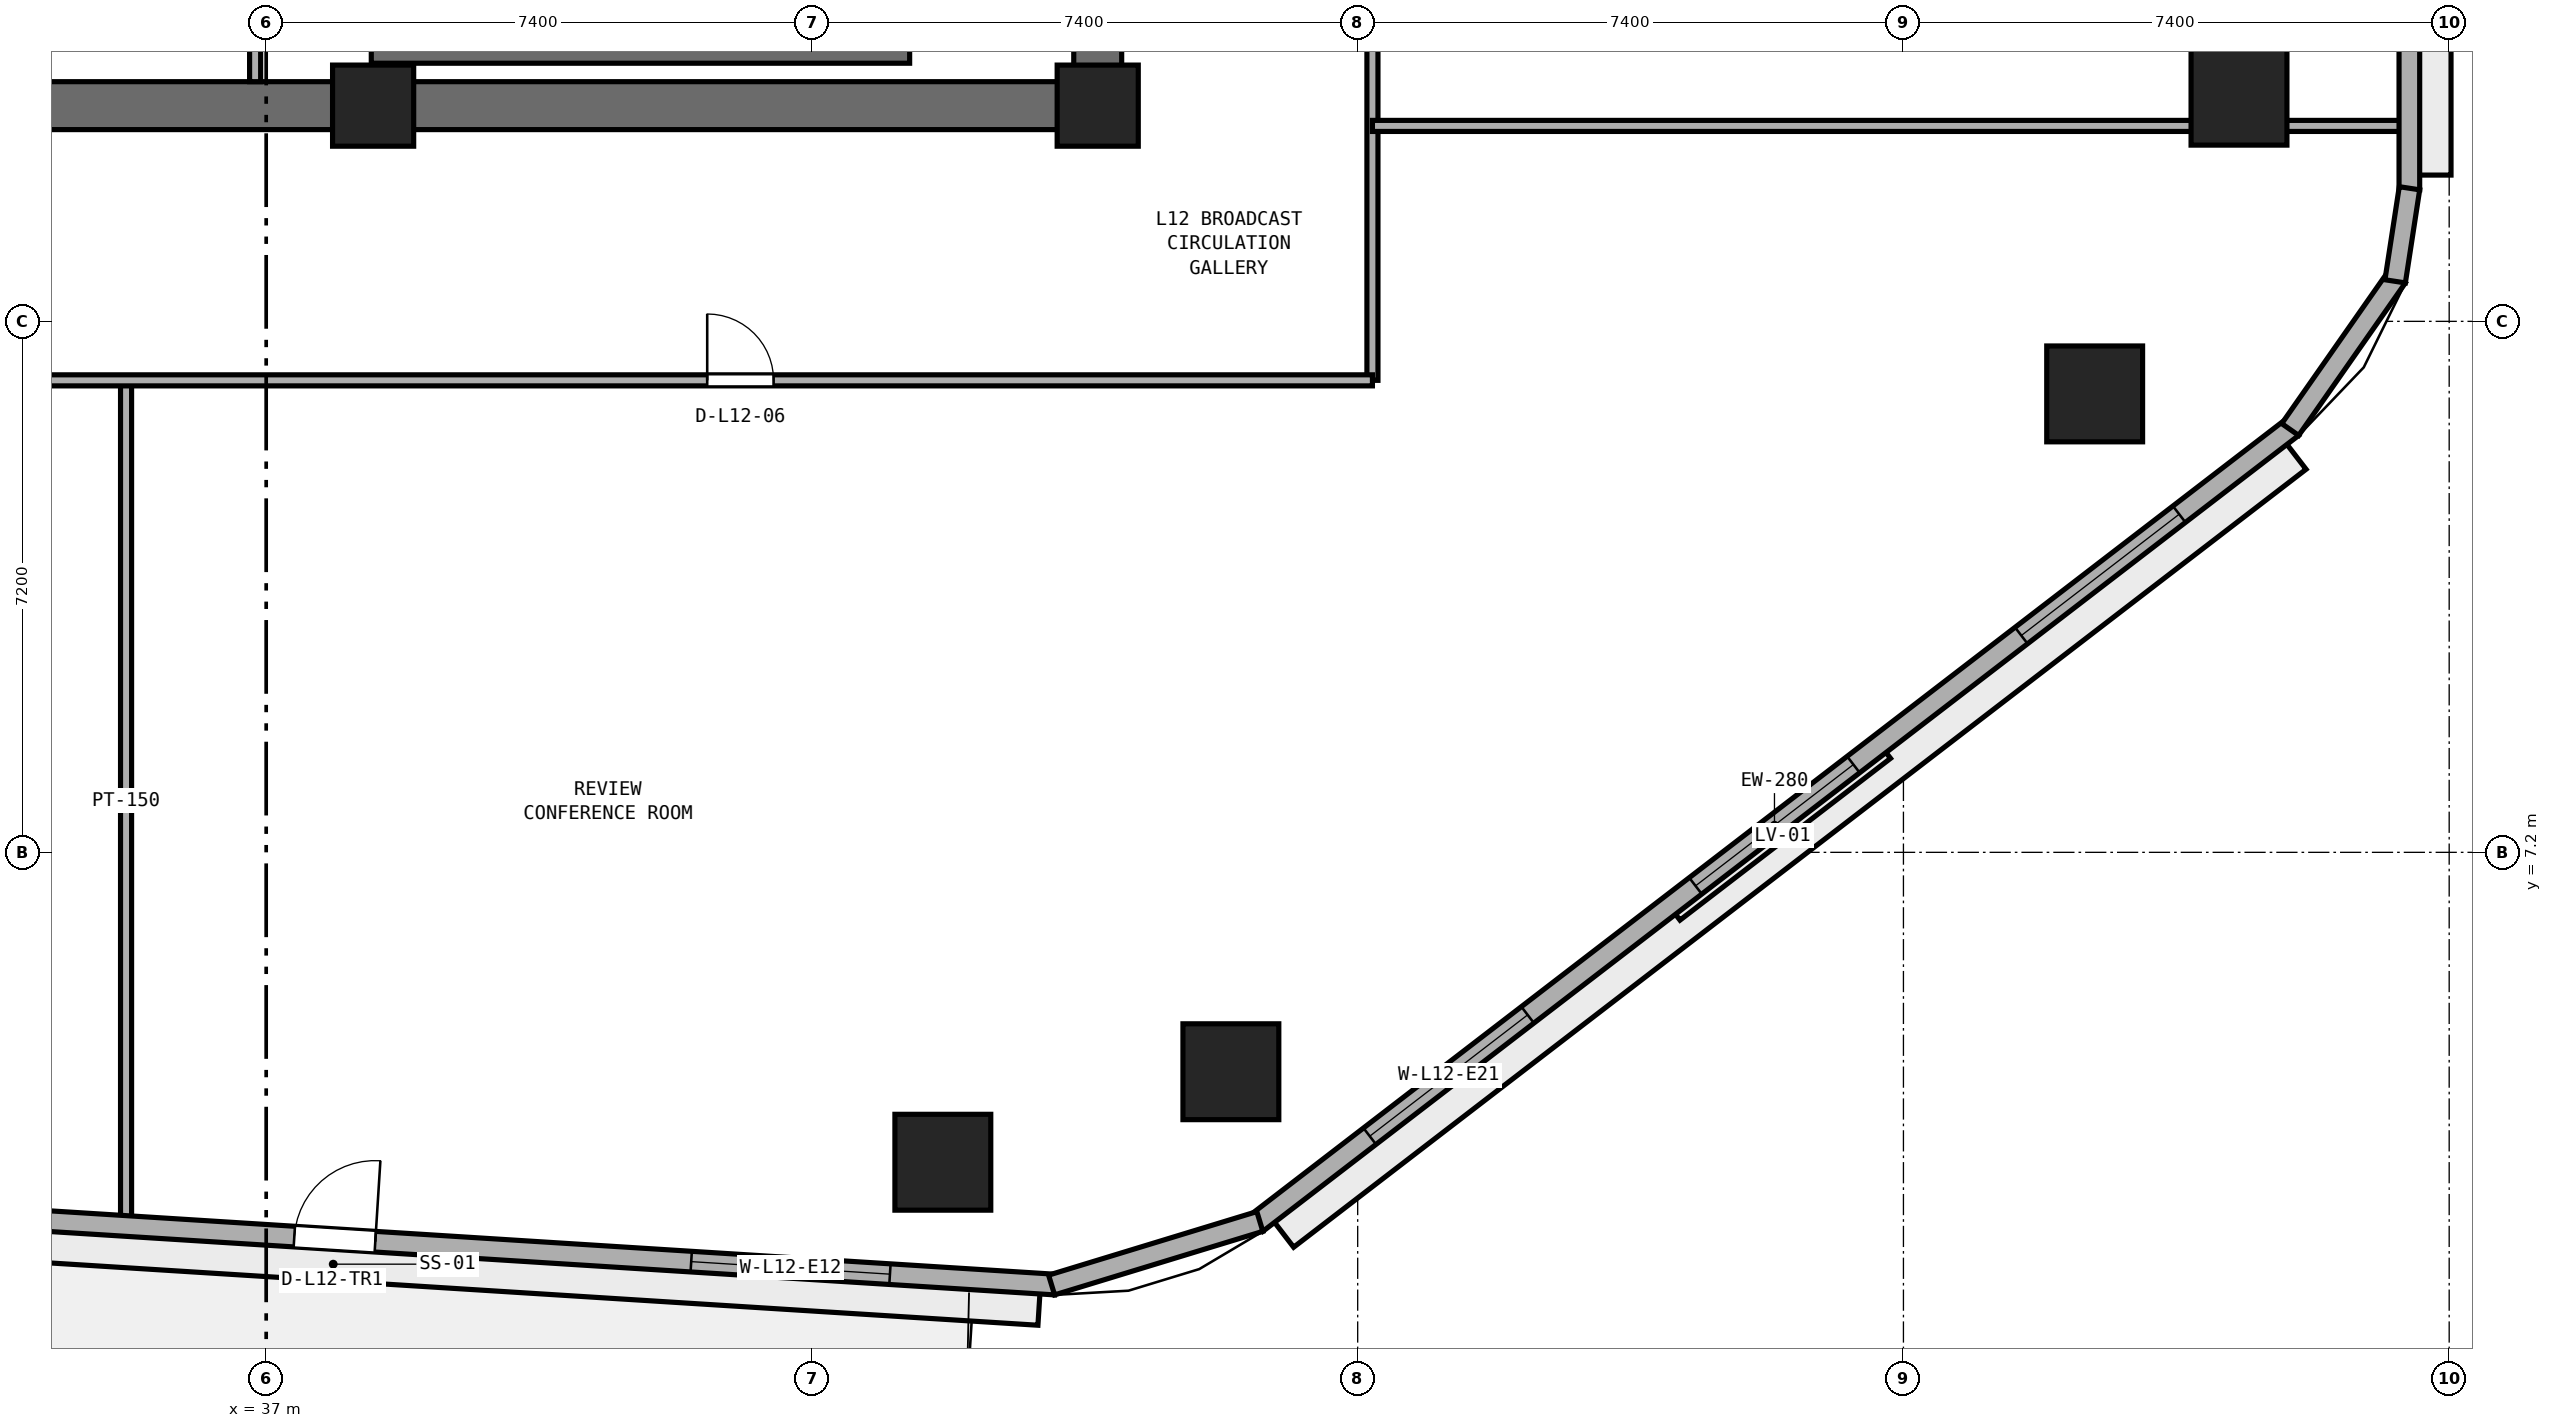
"""IFC4 building model, lengths in metres.
Left out: names, types, materials, properties, quantities, classifications, styles, units other than length and angle.
Written with IfcOpenShell. Run it as: python <this file> out.ifc"""

import sys

from ifc_helpers import new_model, si_unit, direction, frame, frame_2d, origin, origin_2d, place, context, subcontext, project, spatial, rectangle, extrude, element, fill, save


model = new_model("IFC4")
c1 = context("Model", 3, precision=1e-05, world=origin(), true_north=direction((0.0, 1.0)))
c2 = subcontext(c1, "Body", "Model", "MODEL_VIEW")
j1 = project(units=[si_unit("LENGTHUNIT", "METRE"), si_unit("PLANEANGLEUNIT", "RADIAN")], contexts=[c1])
p1 = place(None, origin())
s1 = spatial("IfcSite", under=j1, at=p1, CompositionType="ELEMENT")
p2 = place(p1, origin())
s2 = spatial("IfcBuilding", under=s1, at=p2, CompositionType="ELEMENT")
p3 = place(p2, frame((0.0, 0.0, 51.6)))
s3 = spatial("IfcBuildingStorey", under=s2, at=p3, CompositionType="ELEMENT", Elevation=51.6)
p4 = place(p3, frame((25.4, 17.325, 0.0), z_axis=(0.0, 0.0, 1.0), x_axis=(1.0, 0.0, 0.0)))
e1 = element("IfcWall", 1, at=p4, inside=s3, PredefinedType="SHEAR", context=c2, shape_type="SweptSolid", body=[
    extrude(rectangle(XDim=23.2, YDim=0.65, at=frame_2d((11.6, 0.0))), origin(), (0.0, 0.0, 1.0), 3.525),
])
p5 = place(p3, frame((48.275, 17.65, 0.0), z_axis=(0.0, 0.0, 1.0), x_axis=(0.0, 1.0, 0.0)))
e2 = element("IfcWall", 2, at=p5, inside=s3, PredefinedType="SHEAR", context=c2, shape_type="SweptSolid", body=[
    extrude(rectangle(XDim=15.1, YDim=0.65, at=frame_2d((7.55, 0.0))), origin(), (0.0, 0.0, 1.0), 3.525),
])
p6 = place(p5, frame((5.65, 0.0, 0.0)))
e3 = element("IfcOpeningElement", 3, at=p6, cuts=e2, PredefinedType="OPENING", context=c2, shape_type="SweptSolid", body=[
    extrude(rectangle(XDim=1.5, YDim=2.15, at=frame_2d((0.75, 1.075))), frame((0.0, 0.335, 0.0), z_axis=(0.0, -1.0, 0.0), x_axis=(1.0, 0.0, 0.0)), (0.0, 0.0, 1.0), 0.67),
])
for number, where, z_axis, x_axis in (
    (4, (38.45, 17.325, 0.0), (0.0, 0.0, 1.0), (1.0, 0.0, 0.0)),
    (5, (48.275, 17.325, 0.0), (0.0, 0.0, 1.0), (1.0, 0.0, 0.0)),
):
    element("IfcColumn", number, at=place(p3, frame(where, z_axis=z_axis, x_axis=x_axis)), inside=s3, PredefinedType="PILASTER", context=c2, shape_type="SweptSolid", body=[
        extrude(rectangle(XDim=1.1, YDim=1.1, at=origin_2d()), origin(), (0.0, 0.0, 1.0), 3.8),
    ])
for number, where, z_axis, x_axis in (
    (6, (46.175, 2.998, 0.0), (0.0, 0.0, 1.0), (1.0, 0.0, 0.0)),
    (7, (50.081, 4.225, 0.0), (0.0, 0.0, 1.0), (1.0, 0.0, 0.0)),
    (8, (61.793, 13.416, 0.0), (0.0, 0.0, 1.0), (1.0, 0.0, 0.0)),
    (9, (63.75, 17.44, 0.0), (0.0, 0.0, 1.0), (1.0, 0.0, 0.0)),
):
    element("IfcColumn", number, at=place(p3, frame(where, z_axis=z_axis, x_axis=x_axis)), inside=s3, PredefinedType="COLUMN", context=c2, shape_type="SweptSolid", body=[
        extrude(rectangle(XDim=1.3, YDim=1.3, at=origin_2d()), origin(), (0.0, 0.0, 1.0), 3.8),
    ])
p7 = place(p3, frame((38.425, 18.025, 0.0), z_axis=(0.0, 0.0, 1.0), x_axis=(1.0, 0.0, 0.0)))
e10 = element("IfcWall", 10, at=p7, inside=s3, PredefinedType="SHEAR", context=c2, shape_type="SweptSolid", body=[
    extrude(rectangle(XDim=7.3, YDim=0.25, at=frame_2d((3.65, 0.0))), origin(), (0.0, 0.0, 1.0), 3.525),
])
p8 = place(p3, frame((36.85, 17.65, 0.0), z_axis=(0.0, 0.0, 1.0), x_axis=(0.0, 1.0, 0.0)))
e11 = element("IfcWall", 11, at=p8, inside=s3, PredefinedType="PARTITIONING", context=c2, shape_type="SweptSolid", body=[
    extrude(rectangle(XDim=2.1, YDim=0.15, at=frame_2d((1.05, 0.0))), origin(), (0.0, 0.0, 1.0), 3.525),
])
p9 = place(p3, frame((52.0, 13.6, 0.0), z_axis=(0.0, 0.0, 1.0), x_axis=(0.0, 1.0, 0.0)))
e12 = element("IfcWall", 12, at=p9, inside=s3, PredefinedType="PARTITIONING", context=c2, shape_type="SweptSolid", body=[
    extrude(rectangle(XDim=33.691, YDim=0.15, at=frame_2d((16.846, 0.0))), origin(), (0.0, 0.0, 1.0), 3.525),
])
p10 = place(p9, frame((6.075, 0.0, 0.0)))
e13 = element("IfcOpeningElement", 13, at=p10, cuts=e12, PredefinedType="OPENING", context=c2, shape_type="SweptSolid", body=[
    extrude(rectangle(XDim=1.0, YDim=2.12, at=frame_2d((0.5, 1.06))), frame((0.0, 0.085, 0.0), z_axis=(0.0, -1.0, 0.0), x_axis=(1.0, 0.0, 0.0)), (0.0, 0.0, 1.0), 0.17),
])
p11 = place(p9, frame((12.6, 0.0, 0.0)))
e14 = element("IfcOpeningElement", 14, at=p11, cuts=e12, PredefinedType="OPENING", context=c2, shape_type="SweptSolid", body=[
    extrude(rectangle(XDim=1.0, YDim=2.12, at=frame_2d((0.5, 1.06))), frame((0.0, 0.085, 0.0), z_axis=(0.0, -1.0, 0.0), x_axis=(1.0, 0.0, 0.0)), (0.0, 0.0, 1.0), 0.17),
])
p12 = place(p9, frame((19.35, 0.0, 0.0)))
e15 = element("IfcOpeningElement", 15, at=p12, cuts=e12, PredefinedType="OPENING", context=c2, shape_type="SweptSolid", body=[
    extrude(rectangle(XDim=1.0, YDim=2.12, at=frame_2d((0.5, 1.06))), frame((0.0, 0.085, 0.0), z_axis=(0.0, -1.0, 0.0), x_axis=(1.0, 0.0, 0.0)), (0.0, 0.0, 1.0), 0.17),
])
p13 = place(p3, frame((35.1, 2.198, 0.0), z_axis=(0.0, 0.0, 1.0), x_axis=(0.0, 1.0, 0.0)))
e16 = element("IfcWall", 16, at=p13, inside=s3, PredefinedType="PARTITIONING", context=c2, shape_type="SweptSolid", body=[
    extrude(rectangle(XDim=11.402, YDim=0.15, at=frame_2d((5.701, 0.0))), origin(), (0.0, 0.0, 1.0), 3.525),
])
p14 = place(p3, frame((22.0, 13.6, 0.0), z_axis=(0.0, 0.0, 1.0), x_axis=(1.0, 0.0, 0.0)))
e17 = element("IfcWall", 17, at=p14, inside=s3, PredefinedType="PARTITIONING", context=c2, shape_type="SweptSolid", body=[
    extrude(rectangle(XDim=30.0, YDim=0.15, at=frame_2d((15.0, 0.0))), origin(), (0.0, 0.0, 1.0), 3.525),
])
p15 = place(p14, frame((6.22, 0.0, 0.0)))
e18 = element("IfcOpeningElement", 18, at=p15, cuts=e17, PredefinedType="OPENING", context=c2, shape_type="SweptSolid", body=[
    extrude(rectangle(XDim=0.9, YDim=2.1, at=frame_2d((0.45, 1.05))), frame((0.0, 0.085, 0.0), z_axis=(0.0, -1.0, 0.0), x_axis=(1.0, 0.0, 0.0)), (0.0, 0.0, 1.0), 0.17),
])
p16 = place(p14, frame((20.98, 0.0, 0.0)))
e19 = element("IfcOpeningElement", 19, at=p16, cuts=e17, PredefinedType="OPENING", context=c2, shape_type="SweptSolid", body=[
    extrude(rectangle(XDim=0.9, YDim=2.1, at=frame_2d((0.45, 1.05))), frame((0.0, 0.085, 0.0), z_axis=(0.0, -1.0, 0.0), x_axis=(1.0, 0.0, 0.0)), (0.0, 0.0, 1.0), 0.17),
])
p17 = place(p3, frame((52.0, 17.05, 0.0), z_axis=(0.0, 0.0, 1.0), x_axis=(1.0, 0.0, 0.0)))
e20 = element("IfcWall", 20, at=p17, inside=s3, PredefinedType="PARTITIONING", context=c2, shape_type="SweptSolid", body=[
    extrude(rectangle(XDim=13.995, YDim=0.15, at=frame_2d((6.998, 0.0))), origin(), (0.0, 0.0, 1.0), 3.525),
])
p18 = place(p3, frame((28.161, 2.571, 0.0), z_axis=(0.0, 0.0, 1.0), x_axis=(0.998017288298, -0.06294038654, 0.0)))
e21 = element("IfcWall", 21, at=p18, inside=s3, PredefinedType="STANDARD", context=c2, shape_type="SweptSolid", body=[
    extrude(rectangle(XDim=19.577, YDim=0.28, at=frame_2d((9.789, 0.0))), origin(), (0.0, 0.0, 1.0), 3.525),
])
p19 = place(p18, frame((9.239, 0.0, 0.0)))
e22 = element("IfcOpeningElement", 22, at=p19, cuts=e21, PredefinedType="OPENING", context=c2, shape_type="SweptSolid", body=[
    extrude(rectangle(XDim=1.1, YDim=2.2, at=frame_2d((0.55, 1.1))), frame((0.0, 0.15, 0.0), z_axis=(0.0, -1.0, 0.0), x_axis=(1.0, 0.0, 0.0)), (0.0, 0.0, 1.0), 0.3),
])
p20 = place(p18, frame((2.246, 0.0, 0.9)))
e23 = element("IfcOpeningElement", 23, at=p20, cuts=e21, PredefinedType="OPENING", context=c2, shape_type="SweptSolid", body=[
    extrude(rectangle(XDim=2.7, YDim=1.75, at=frame_2d((1.35, 0.875))), frame((0.0, 0.15, 0.0), z_axis=(0.0, -1.0, 0.0), x_axis=(1.0, 0.0, 0.0)), (0.0, 0.0, 1.0), 0.3),
])
p21 = place(p18, frame((14.631, 0.0, 0.9)))
e24 = element("IfcOpeningElement", 24, at=p21, cuts=e21, PredefinedType="OPENING", context=c2, shape_type="SweptSolid", body=[
    extrude(rectangle(XDim=2.7, YDim=1.75, at=frame_2d((1.35, 0.875))), frame((0.0, 0.15, 0.0), z_axis=(0.0, -1.0, 0.0), x_axis=(1.0, 0.0, 0.0)), (0.0, 0.0, 1.0), 0.3),
])
p22 = place(p3, frame((50.429, 2.172, 0.0), z_axis=(0.0, 0.0, 1.0), x_axis=(0.792937466367, 0.609303023488, 0.0)))
e25 = element("IfcWall", 25, at=p22, inside=s3, PredefinedType="STANDARD", context=c2, shape_type="SweptSolid", body=[
    extrude(rectangle(XDim=17.713, YDim=0.28, at=frame_2d((8.856, 0.0))), origin(), (0.0, 0.0, 1.0), 3.525),
])
p23 = place(p22, frame((1.936, 0.0, 0.9)))
e26 = element("IfcOpeningElement", 26, at=p23, cuts=e25, PredefinedType="OPENING", context=c2, shape_type="SweptSolid", body=[
    extrude(rectangle(XDim=2.7, YDim=1.75, at=frame_2d((1.35, 0.875))), frame((0.0, 0.15, 0.0), z_axis=(0.0, -1.0, 0.0), x_axis=(1.0, 0.0, 0.0)), (0.0, 0.0, 1.0), 0.3),
])
p24 = place(p22, frame((7.506, 0.0, 0.9)))
e27 = element("IfcOpeningElement", 27, at=p24, cuts=e25, PredefinedType="OPENING", context=c2, shape_type="SweptSolid", body=[
    extrude(rectangle(XDim=2.7, YDim=1.75, at=frame_2d((1.35, 0.875))), frame((0.0, 0.15, 0.0), z_axis=(0.0, -1.0, 0.0), x_axis=(1.0, 0.0, 0.0)), (0.0, 0.0, 1.0), 0.3),
])
p25 = place(p22, frame((13.077, 0.0, 0.9)))
e28 = element("IfcOpeningElement", 28, at=p25, cuts=e25, PredefinedType="OPENING", context=c2, shape_type="SweptSolid", body=[
    extrude(rectangle(XDim=2.7, YDim=1.75, at=frame_2d((1.35, 0.875))), frame((0.0, 0.15, 0.0), z_axis=(0.0, -1.0, 0.0), x_axis=(1.0, 0.0, 0.0)), (0.0, 0.0, 1.0), 0.3),
])
p26 = place(p3, frame((66.06, 16.183, 0.0), z_axis=(0.0, 0.0, 1.0), x_axis=(0.0, 1.0, 0.0)))
e29 = element("IfcWall", 29, at=p26, inside=s3, PredefinedType="STANDARD", context=c2, shape_type="SweptSolid", body=[
    extrude(rectangle(XDim=19.331, YDim=0.28, at=frame_2d((9.666, 0.0))), origin(), (0.0, 0.0, 1.0), 3.525),
])
p27 = place(p26, frame((2.205, 0.0, 0.9)))
e30 = element("IfcOpeningElement", 30, at=p27, cuts=e29, PredefinedType="OPENING", context=c2, shape_type="SweptSolid", body=[
    extrude(rectangle(XDim=2.7, YDim=1.75, at=frame_2d((1.35, 0.875))), frame((0.0, 0.15, 0.0), z_axis=(0.0, -1.0, 0.0), x_axis=(1.0, 0.0, 0.0)), (0.0, 0.0, 1.0), 0.3),
])
p28 = place(p26, frame((8.315, 0.0, 0.9)))
e31 = element("IfcOpeningElement", 31, at=p28, cuts=e29, PredefinedType="OPENING", context=c2, shape_type="SweptSolid", body=[
    extrude(rectangle(XDim=2.7, YDim=1.75, at=frame_2d((1.35, 0.875))), frame((0.0, 0.15, 0.0), z_axis=(0.0, -1.0, 0.0), x_axis=(1.0, 0.0, 0.0)), (0.0, 0.0, 1.0), 0.3),
])
p29 = place(p26, frame((14.426, 0.0, 0.9)))
e32 = element("IfcOpeningElement", 32, at=p29, cuts=e29, PredefinedType="OPENING", context=c2, shape_type="SweptSolid", body=[
    extrude(rectangle(XDim=2.7, YDim=1.75, at=frame_2d((1.35, 0.875))), frame((0.0, 0.15, 0.0), z_axis=(0.0, -1.0, 0.0), x_axis=(1.0, 0.0, 0.0)), (0.0, 0.0, 1.0), 0.3),
])
p30 = place(p3, frame((47.65, 1.333, 0.0), z_axis=(0.0, 0.0, 1.0), x_axis=(0.956461287977, 0.291859220516, 0.0)))
e33 = element("IfcWall", 33, at=p30, inside=s3, PredefinedType="STANDARD", context=c2, shape_type="SweptSolid", body=[
    extrude(rectangle(XDim=2.952, YDim=0.28, at=frame_2d((1.476, 0.0))), origin(), (0.0, 0.0, 1.0), 3.525),
])
p31 = place(p3, frame((64.444, 12.933, 0.0), z_axis=(0.0, 0.0, 1.0), x_axis=(0.573176686443, 0.819431806875, 0.0)))
e34 = element("IfcWall", 34, at=p31, inside=s3, PredefinedType="STANDARD", context=c2, shape_type="SweptSolid", body=[
    extrude(rectangle(XDim=2.524, YDim=0.28, at=frame_2d((1.262, 0.0))), origin(), (0.0, 0.0, 1.0), 3.525),
])
p32 = place(p3, frame((65.867, 14.943, 0.0), z_axis=(0.0, 0.0, 1.0), x_axis=(0.152014078361, 0.988378328364, 0.0)))
e35 = element("IfcWall", 35, at=p32, inside=s3, PredefinedType="STANDARD", context=c2, shape_type="SweptSolid", body=[
    extrude(rectangle(XDim=1.277, YDim=0.28, at=frame_2d((0.638, 0.0))), origin(), (0.0, 0.0, 1.0), 3.525),
])
p33 = place(p16, origin())
e36 = element("IfcDoor", 36, at=p33, inside=s3, OperationType="SINGLE_SWING_LEFT", PredefinedType="DOOR", context=c2, shape_type="SweptSolid", body=[
    extrude(rectangle(XDim=0.9, YDim=2.1, at=frame_2d((0.45, 1.05))), frame((0.0, 0.025, 0.0), z_axis=(0.0, -1.0, 0.0), x_axis=(1.0, 0.0, 0.0)), (0.0, 0.0, 1.0), 0.05),
])
fill(e19, e36)
p34 = place(p19, origin())
e37 = element("IfcDoor", 37, at=p34, inside=s3, OperationType="SINGLE_SWING_RIGHT", PredefinedType="DOOR", context=c2, shape_type="SweptSolid", body=[
    extrude(rectangle(XDim=1.1, YDim=2.2, at=frame_2d((0.55, 1.1))), frame((0.0, 0.025, 0.0), z_axis=(0.0, -1.0, 0.0), x_axis=(1.0, 0.0, 0.0)), (0.0, 0.0, 1.0), 0.05),
])
fill(e22, e37)
p35 = place(p21, origin())
e38 = element("IfcWindow", 38, at=p35, inside=s3, PartitioningType="SINGLE_PANEL", PredefinedType="WINDOW", context=c2, shape_type="SweptSolid", body=[
    extrude(rectangle(XDim=2.7, YDim=1.75, at=frame_2d((1.35, 0.875))), frame((0.0, 0.03, 0.0), z_axis=(0.0, -1.0, 0.0), x_axis=(1.0, 0.0, 0.0)), (0.0, 0.0, 1.0), 0.06),
])
fill(e24, e38)
p36 = place(p23, origin())
e39 = element("IfcWindow", 39, at=p36, inside=s3, PartitioningType="SINGLE_PANEL", PredefinedType="WINDOW", context=c2, shape_type="SweptSolid", body=[
    extrude(rectangle(XDim=2.7, YDim=1.75, at=frame_2d((1.35, 0.875))), frame((0.0, 0.03, 0.0), z_axis=(0.0, -1.0, 0.0), x_axis=(1.0, 0.0, 0.0)), (0.0, 0.0, 1.0), 0.06),
])
fill(e26, e39)
p37 = place(p24, origin())
e40 = element("IfcWindow", 40, at=p37, inside=s3, PartitioningType="SINGLE_PANEL", PredefinedType="WINDOW", context=c2, shape_type="SweptSolid", body=[
    extrude(rectangle(XDim=2.7, YDim=1.75, at=frame_2d((1.35, 0.875))), frame((0.0, 0.03, 0.0), z_axis=(0.0, -1.0, 0.0), x_axis=(1.0, 0.0, 0.0)), (0.0, 0.0, 1.0), 0.06),
])
fill(e27, e40)
p38 = place(p25, origin())
e41 = element("IfcWindow", 41, at=p38, inside=s3, PartitioningType="SINGLE_PANEL", PredefinedType="WINDOW", context=c2, shape_type="SweptSolid", body=[
    extrude(rectangle(XDim=2.7, YDim=1.75, at=frame_2d((1.35, 0.875))), frame((0.0, 0.03, 0.0), z_axis=(0.0, -1.0, 0.0), x_axis=(1.0, 0.0, 0.0)), (0.0, 0.0, 1.0), 0.06),
])
fill(e28, e41)
save(model, sys.argv[1])
